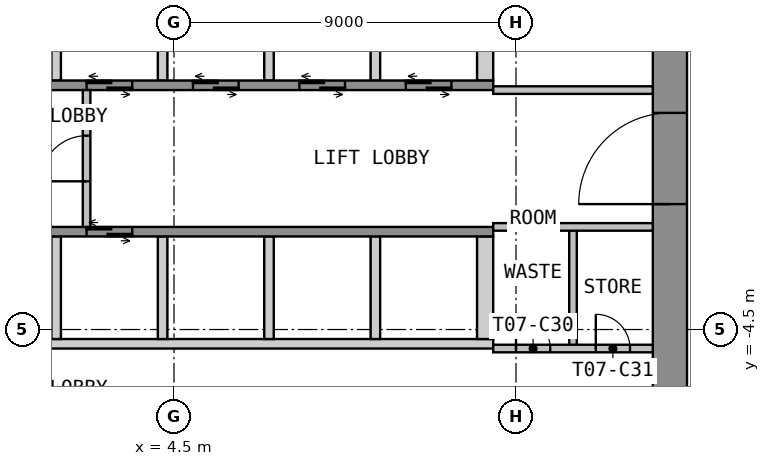
"""IFC4 building model, lengths in metres.
Left out: names, types, materials, properties, quantities, classifications, styles, units other than length and angle.
Written with IfcOpenShell. Run it as: python <this file> out.ifc"""

import sys

from ifc_helpers import new_model, si_unit, direction, frame, frame_2d, origin, place, context, subcontext, project, spatial, polyline, rectangle, outline, extrude, element, fill, save


model = new_model("IFC4")
c1 = context("Model", 3, precision=1e-05, world=origin(), true_north=direction((0.0, 1.0)))
c2 = subcontext(c1, "Body", "Model", "MODEL_VIEW")
j1 = project(units=[si_unit("LENGTHUNIT", "METRE"), si_unit("PLANEANGLEUNIT", "RADIAN")], contexts=[c1])
p1 = place(None, origin())
s1 = spatial("IfcSite", under=j1, at=p1, CompositionType="ELEMENT")
p2 = place(p1, origin())
s2 = spatial("IfcBuilding", under=s1, at=p2, CompositionType="ELEMENT")
p3 = place(p2, frame((0.0, 0.0, 104.7)))
s3 = spatial("IfcBuildingStorey", under=s2, at=p3, CompositionType="ELEMENT", Elevation=104.7)
p4 = place(p3, frame((17.55, -12.6, 0.0), z_axis=(0.0, 0.0, 1.0), x_axis=(0.0, 1.0, 0.0)))
e1 = element("IfcWall", 1, at=p4, inside=s3, PredefinedType="SHEAR", context=c2, shape_type="SweptSolid", body=[
    extrude(rectangle(XDim=25.2, YDim=0.9, at=frame_2d((12.6, 0.0))), origin(), (0.0, 0.0, 1.0), 3.525),
])
p5 = place(p4, frame((11.4, 0.0, 0.0)))
e2 = element("IfcOpeningElement", 2, at=p5, cuts=e1, PredefinedType="OPENING", context=c2, shape_type="SweptSolid", body=[
    extrude(rectangle(XDim=2.4, YDim=2.1, at=frame_2d((1.2, 1.05))), frame((0.0, 0.46, 0.0), z_axis=(0.0, -1.0, 0.0), x_axis=(1.0, 0.0, 0.0)), (0.0, 0.0, 1.0), 0.92),
])
p6 = place(p3, origin())
e3 = element("IfcWall", 3, at=p6, inside=s3, PredefinedType="SHEAR", context=c2, shape_type="SweptSolid", body=[
    extrude(outline(polyline([(1.275, 2.05), (1.525, 2.05), (1.525, 4.75), (1.275, 4.75), (1.275, 2.05)])), origin(), (0.0, 0.0, 1.0), 3.525),
])
p7 = place(p3, origin())
e4 = element("IfcWall", 4, at=p7, inside=s3, PredefinedType="SHEAR", context=c2, shape_type="SweptSolid", body=[
    extrude(outline(polyline([(4.075, 2.05), (4.325, 2.05), (4.325, 4.75), (4.075, 4.75), (4.075, 2.05)])), origin(), (0.0, 0.0, 1.0), 3.525),
])
p8 = place(p3, origin())
e5 = element("IfcWall", 5, at=p8, inside=s3, PredefinedType="SHEAR", context=c2, shape_type="SweptSolid", body=[
    extrude(outline(polyline([(6.875, 2.05), (7.125, 2.05), (7.125, 4.75), (6.875, 4.75), (6.875, 2.05)])), origin(), (0.0, 0.0, 1.0), 3.525),
])
p9 = place(p3, origin())
e6 = element("IfcWall", 6, at=p9, inside=s3, PredefinedType="SHEAR", context=c2, shape_type="SweptSolid", body=[
    extrude(outline(polyline([(9.675, 2.05), (9.925, 2.05), (9.925, 4.75), (9.675, 4.75), (9.675, 2.05)])), origin(), (0.0, 0.0, 1.0), 3.525),
])
p10 = place(p3, origin())
e7 = element("IfcWall", 7, at=p10, inside=s3, PredefinedType="SHEAR", context=c2, shape_type="SweptSolid", body=[
    extrude(outline(polyline([(12.475, 2.05), (12.9, 2.05), (12.9, 4.75), (12.475, 4.75), (12.475, 2.05)])), origin(), (0.0, 0.0, 1.0), 3.525),
])
p11 = place(p3, frame((-12.9, 1.925, 0.0), z_axis=(0.0, 0.0, 1.0), x_axis=(1.0, 0.0, 0.0)))
e8 = element("IfcWall", 8, at=p11, inside=s3, PredefinedType="SHEAR", context=c2, shape_type="SweptSolid", body=[
    extrude(rectangle(XDim=25.8, YDim=0.25, at=frame_2d((12.9, 0.0))), origin(), (0.0, 0.0, 1.0), 3.525),
])
p12 = place(p11, frame((9.5, 0.0, 0.0)))
e9 = element("IfcOpeningElement", 9, at=p12, cuts=e8, PredefinedType="OPENING", context=c2, shape_type="SweptSolid", body=[
    extrude(rectangle(XDim=1.2, YDim=2.1, at=frame_2d((0.6, 1.05))), frame((0.0, 0.135, 0.0), z_axis=(0.0, -1.0, 0.0), x_axis=(1.0, 0.0, 0.0)), (0.0, 0.0, 1.0), 0.27),
])
p13 = place(p11, frame((12.3, 0.0, 0.0)))
e10 = element("IfcOpeningElement", 10, at=p13, cuts=e8, PredefinedType="OPENING", context=c2, shape_type="SweptSolid", body=[
    extrude(rectangle(XDim=1.2, YDim=2.1, at=frame_2d((0.6, 1.05))), frame((0.0, 0.135, 0.0), z_axis=(0.0, -1.0, 0.0), x_axis=(1.0, 0.0, 0.0)), (0.0, 0.0, 1.0), 0.27),
])
p14 = place(p11, frame((15.1, 0.0, 0.0)))
e11 = element("IfcOpeningElement", 11, at=p14, cuts=e8, PredefinedType="OPENING", context=c2, shape_type="SweptSolid", body=[
    extrude(rectangle(XDim=1.2, YDim=2.1, at=frame_2d((0.6, 1.05))), frame((0.0, 0.135, 0.0), z_axis=(0.0, -1.0, 0.0), x_axis=(1.0, 0.0, 0.0)), (0.0, 0.0, 1.0), 0.27),
])
p15 = place(p11, frame((17.9, 0.0, 0.0)))
e12 = element("IfcOpeningElement", 12, at=p15, cuts=e8, PredefinedType="OPENING", context=c2, shape_type="SweptSolid", body=[
    extrude(rectangle(XDim=1.2, YDim=2.1, at=frame_2d((0.6, 1.05))), frame((0.0, 0.135, 0.0), z_axis=(0.0, -1.0, 0.0), x_axis=(1.0, 0.0, 0.0)), (0.0, 0.0, 1.0), 0.27),
])
p16 = place(p11, frame((20.7, 0.0, 0.0)))
e13 = element("IfcOpeningElement", 13, at=p16, cuts=e8, PredefinedType="OPENING", context=c2, shape_type="SweptSolid", body=[
    extrude(rectangle(XDim=1.2, YDim=2.1, at=frame_2d((0.6, 1.05))), frame((0.0, 0.135, 0.0), z_axis=(0.0, -1.0, 0.0), x_axis=(1.0, 0.0, 0.0)), (0.0, 0.0, 1.0), 0.27),
])
p17 = place(p11, frame((23.5, 0.0, 0.0)))
e14 = element("IfcOpeningElement", 14, at=p17, cuts=e8, PredefinedType="OPENING", context=c2, shape_type="SweptSolid", body=[
    extrude(rectangle(XDim=1.2, YDim=2.1, at=frame_2d((0.6, 1.05))), frame((0.0, 0.135, 0.0), z_axis=(0.0, -1.0, 0.0), x_axis=(1.0, 0.0, 0.0)), (0.0, 0.0, 1.0), 0.27),
])
p18 = place(p3, origin())
e15 = element("IfcWall", 15, at=p18, inside=s3, PredefinedType="SHEAR", context=c2, shape_type="SweptSolid", body=[
    extrude(outline(polyline([(-12.9, -5.0), (12.9, -5.0), (12.9, -4.75), (-12.9, -4.75), (-12.9, -5.0)])), origin(), (0.0, 0.0, 1.0), 3.525),
])
p19 = place(p3, origin())
e16 = element("IfcWall", 16, at=p19, inside=s3, PredefinedType="SHEAR", context=c2, shape_type="SweptSolid", body=[
    extrude(outline(polyline([(1.275, -4.75), (1.525, -4.75), (1.525, -2.05), (1.275, -2.05), (1.275, -4.75)])), origin(), (0.0, 0.0, 1.0), 3.525),
])
p20 = place(p3, origin())
e17 = element("IfcWall", 17, at=p20, inside=s3, PredefinedType="SHEAR", context=c2, shape_type="SweptSolid", body=[
    extrude(outline(polyline([(4.075, -4.75), (4.325, -4.75), (4.325, -2.05), (4.075, -2.05), (4.075, -4.75)])), origin(), (0.0, 0.0, 1.0), 3.525),
])
p21 = place(p3, origin())
e18 = element("IfcWall", 18, at=p21, inside=s3, PredefinedType="SHEAR", context=c2, shape_type="SweptSolid", body=[
    extrude(outline(polyline([(6.875, -4.75), (7.125, -4.75), (7.125, -2.05), (6.875, -2.05), (6.875, -4.75)])), origin(), (0.0, 0.0, 1.0), 3.525),
])
p22 = place(p3, origin())
e19 = element("IfcWall", 19, at=p22, inside=s3, PredefinedType="SHEAR", context=c2, shape_type="SweptSolid", body=[
    extrude(outline(polyline([(9.675, -4.75), (9.925, -4.75), (9.925, -2.05), (9.675, -2.05), (9.675, -4.75)])), origin(), (0.0, 0.0, 1.0), 3.525),
])
p23 = place(p3, origin())
e20 = element("IfcWall", 20, at=p23, inside=s3, PredefinedType="SHEAR", context=c2, shape_type="SweptSolid", body=[
    extrude(outline(polyline([(12.475, -4.75), (12.9, -4.75), (12.9, -2.05), (12.475, -2.05), (12.475, -4.75)])), origin(), (0.0, 0.0, 1.0), 3.525),
])
p24 = place(p3, frame((-12.9, -1.925, 0.0), z_axis=(0.0, 0.0, 1.0), x_axis=(1.0, 0.0, 0.0)))
e21 = element("IfcWall", 21, at=p24, inside=s3, PredefinedType="SHEAR", context=c2, shape_type="SweptSolid", body=[
    extrude(rectangle(XDim=25.8, YDim=0.25, at=frame_2d((12.9, 0.0))), origin(), (0.0, 0.0, 1.0), 3.525),
])
p25 = place(p24, frame((1.1, 0.0, 0.0)))
e22 = element("IfcOpeningElement", 22, at=p25, cuts=e21, PredefinedType="OPENING", context=c2, shape_type="SweptSolid", body=[
    extrude(rectangle(XDim=1.2, YDim=2.1, at=frame_2d((0.6, 1.05))), frame((0.0, 0.135, 0.0), z_axis=(0.0, -1.0, 0.0), x_axis=(1.0, 0.0, 0.0)), (0.0, 0.0, 1.0), 0.27),
])
p26 = place(p24, frame((3.9, 0.0, 0.0)))
e23 = element("IfcOpeningElement", 23, at=p26, cuts=e21, PredefinedType="OPENING", context=c2, shape_type="SweptSolid", body=[
    extrude(rectangle(XDim=1.2, YDim=2.1, at=frame_2d((0.6, 1.05))), frame((0.0, 0.135, 0.0), z_axis=(0.0, -1.0, 0.0), x_axis=(1.0, 0.0, 0.0)), (0.0, 0.0, 1.0), 0.27),
])
p27 = place(p24, frame((6.7, 0.0, 0.0)))
e24 = element("IfcOpeningElement", 24, at=p27, cuts=e21, PredefinedType="OPENING", context=c2, shape_type="SweptSolid", body=[
    extrude(rectangle(XDim=1.2, YDim=2.1, at=frame_2d((0.6, 1.05))), frame((0.0, 0.135, 0.0), z_axis=(0.0, -1.0, 0.0), x_axis=(1.0, 0.0, 0.0)), (0.0, 0.0, 1.0), 0.27),
])
p28 = place(p24, frame((9.5, 0.0, 0.0)))
e25 = element("IfcOpeningElement", 25, at=p28, cuts=e21, PredefinedType="OPENING", context=c2, shape_type="SweptSolid", body=[
    extrude(rectangle(XDim=1.2, YDim=2.1, at=frame_2d((0.6, 1.05))), frame((0.0, 0.135, 0.0), z_axis=(0.0, -1.0, 0.0), x_axis=(1.0, 0.0, 0.0)), (0.0, 0.0, 1.0), 0.27),
])
p29 = place(p24, frame((12.3, 0.0, 0.0)))
e26 = element("IfcOpeningElement", 26, at=p29, cuts=e21, PredefinedType="OPENING", context=c2, shape_type="SweptSolid", body=[
    extrude(rectangle(XDim=1.2, YDim=2.1, at=frame_2d((0.6, 1.05))), frame((0.0, 0.135, 0.0), z_axis=(0.0, -1.0, 0.0), x_axis=(1.0, 0.0, 0.0)), (0.0, 0.0, 1.0), 0.27),
])
p30 = place(p24, frame((15.1, 0.0, 0.0)))
e27 = element("IfcOpeningElement", 27, at=p30, cuts=e21, PredefinedType="OPENING", context=c2, shape_type="SweptSolid", body=[
    extrude(rectangle(XDim=1.2, YDim=2.1, at=frame_2d((0.6, 1.05))), frame((0.0, 0.135, 0.0), z_axis=(0.0, -1.0, 0.0), x_axis=(1.0, 0.0, 0.0)), (0.0, 0.0, 1.0), 0.27),
])
p31 = place(p3, frame((2.2, -1.8, 0.0), z_axis=(0.0, 0.0, 1.0), x_axis=(0.0, 1.0, 0.0)))
e28 = element("IfcWall", 28, at=p31, inside=s3, PredefinedType="PARTITIONING", context=c2, shape_type="SweptSolid", body=[
    extrude(rectangle(XDim=3.6, YDim=0.2, at=frame_2d((1.8, 0.0))), origin(), (0.0, 0.0, 1.0), 3.525),
])
p32 = place(p31, frame((1.2, 0.0, 0.0)))
e29 = element("IfcOpeningElement", 29, at=p32, cuts=e28, PredefinedType="OPENING", context=c2, shape_type="SweptSolid", body=[
    extrude(rectangle(XDim=1.2, YDim=2.1, at=frame_2d((0.6, 1.05))), frame((0.0, 0.11, 0.0), z_axis=(0.0, -1.0, 0.0), x_axis=(1.0, 0.0, 0.0)), (0.0, 0.0, 1.0), 0.22),
])
p33 = place(p3, frame((12.9, 1.8, 0.0), z_axis=(0.0, 0.0, 1.0), x_axis=(1.0, 0.0, 0.0)))
e30 = element("IfcWall", 30, at=p33, inside=s3, PredefinedType="PARTITIONING", context=c2, shape_type="SweptSolid", body=[
    extrude(rectangle(XDim=4.2, YDim=0.2, at=frame_2d((2.1, 0.0))), origin(), (0.0, 0.0, 1.0), 3.525),
])
p34 = place(p3, frame((15.0, -5.0, 0.0), z_axis=(0.0, 0.0, 1.0), x_axis=(0.0, 1.0, 0.0)))
e31 = element("IfcWall", 31, at=p34, inside=s3, PredefinedType="PARTITIONING", context=c2, shape_type="SweptSolid", body=[
    extrude(rectangle(XDim=3.2, YDim=0.2, at=frame_2d((1.6, 0.0))), origin(), (0.0, 0.0, 1.0), 3.525),
])
p35 = place(p3, frame((12.9, -5.0, 0.0), z_axis=(0.0, 0.0, 1.0), x_axis=(1.0, 0.0, 0.0)))
e32 = element("IfcWall", 32, at=p35, inside=s3, PredefinedType="PARTITIONING", context=c2, shape_type="SweptSolid", body=[
    extrude(rectangle(XDim=4.2, YDim=0.2, at=frame_2d((2.1, 0.0))), origin(), (0.0, 0.0, 1.0), 3.525),
])
p36 = place(p35, frame((0.6, 0.0, 0.0)))
e33 = element("IfcOpeningElement", 33, at=p36, cuts=e32, PredefinedType="OPENING", context=c2, shape_type="SweptSolid", body=[
    extrude(rectangle(XDim=0.9, YDim=2.1, at=frame_2d((0.45, 1.05))), frame((0.0, 0.11, 0.0), z_axis=(0.0, -1.0, 0.0), x_axis=(1.0, 0.0, 0.0)), (0.0, 0.0, 1.0), 0.22),
])
p37 = place(p35, frame((2.7, 0.0, 0.0)))
e34 = element("IfcOpeningElement", 34, at=p37, cuts=e32, PredefinedType="OPENING", context=c2, shape_type="SweptSolid", body=[
    extrude(rectangle(XDim=0.9, YDim=2.1, at=frame_2d((0.45, 1.05))), frame((0.0, 0.11, 0.0), z_axis=(0.0, -1.0, 0.0), x_axis=(1.0, 0.0, 0.0)), (0.0, 0.0, 1.0), 0.22),
])
p38 = place(p3, frame((12.9, -1.8, 0.0), z_axis=(0.0, 0.0, 1.0), x_axis=(1.0, 0.0, 0.0)))
e35 = element("IfcWall", 35, at=p38, inside=s3, PredefinedType="PARTITIONING", context=c2, shape_type="SweptSolid", body=[
    extrude(rectangle(XDim=4.2, YDim=0.2, at=frame_2d((2.1, 0.0))), origin(), (0.0, 0.0, 1.0), 3.525),
])
p39 = place(p5, origin())
e36 = element("IfcDoor", 36, at=p39, inside=s3, OperationType="DOUBLE_DOOR_DOUBLE_SWING", PredefinedType="DOOR", context=c2, shape_type="SweptSolid", body=[
    extrude(rectangle(XDim=2.4, YDim=2.1, at=frame_2d((1.2, 1.05))), frame((0.0, 0.025, 0.0), z_axis=(0.0, -1.0, 0.0), x_axis=(1.0, 0.0, 0.0)), (0.0, 0.0, 1.0), 0.05),
])
fill(e2, e36)
p40 = place(p14, origin())
e37 = element("IfcDoor", 37, at=p40, inside=s3, OperationType="DOUBLE_DOOR_SLIDING", PredefinedType="DOOR", context=c2, shape_type="SweptSolid", body=[
    extrude(rectangle(XDim=1.2, YDim=2.1, at=frame_2d((0.6, 1.05))), frame((0.0, 0.025, 0.0), z_axis=(0.0, -1.0, 0.0), x_axis=(1.0, 0.0, 0.0)), (0.0, 0.0, 1.0), 0.05),
])
fill(e11, e37)
p41 = place(p15, origin())
e38 = element("IfcDoor", 38, at=p41, inside=s3, OperationType="DOUBLE_DOOR_SLIDING", PredefinedType="DOOR", context=c2, shape_type="SweptSolid", body=[
    extrude(rectangle(XDim=1.2, YDim=2.1, at=frame_2d((0.6, 1.05))), frame((0.0, 0.025, 0.0), z_axis=(0.0, -1.0, 0.0), x_axis=(1.0, 0.0, 0.0)), (0.0, 0.0, 1.0), 0.05),
])
fill(e12, e38)
p42 = place(p16, origin())
e39 = element("IfcDoor", 39, at=p42, inside=s3, OperationType="DOUBLE_DOOR_SLIDING", PredefinedType="DOOR", context=c2, shape_type="SweptSolid", body=[
    extrude(rectangle(XDim=1.2, YDim=2.1, at=frame_2d((0.6, 1.05))), frame((0.0, 0.025, 0.0), z_axis=(0.0, -1.0, 0.0), x_axis=(1.0, 0.0, 0.0)), (0.0, 0.0, 1.0), 0.05),
])
fill(e13, e39)
p43 = place(p17, origin())
e40 = element("IfcDoor", 40, at=p43, inside=s3, OperationType="DOUBLE_DOOR_SLIDING", PredefinedType="DOOR", context=c2, shape_type="SweptSolid", body=[
    extrude(rectangle(XDim=1.2, YDim=2.1, at=frame_2d((0.6, 1.05))), frame((0.0, 0.025, 0.0), z_axis=(0.0, -1.0, 0.0), x_axis=(1.0, 0.0, 0.0)), (0.0, 0.0, 1.0), 0.05),
])
fill(e14, e40)
p44 = place(p30, origin())
e41 = element("IfcDoor", 41, at=p44, inside=s3, OperationType="DOUBLE_DOOR_SLIDING", PredefinedType="DOOR", context=c2, shape_type="SweptSolid", body=[
    extrude(rectangle(XDim=1.2, YDim=2.1, at=frame_2d((0.6, 1.05))), frame((0.0, 0.025, 0.0), z_axis=(0.0, -1.0, 0.0), x_axis=(1.0, 0.0, 0.0)), (0.0, 0.0, 1.0), 0.05),
])
fill(e27, e41)
p45 = place(p32, origin())
e42 = element("IfcDoor", 42, at=p45, inside=s3, OperationType="SINGLE_SWING_LEFT", PredefinedType="DOOR", context=c2, shape_type="SweptSolid", body=[
    extrude(rectangle(XDim=1.2, YDim=2.1, at=frame_2d((0.6, 1.05))), frame((0.0, 0.025, 0.0), z_axis=(0.0, -1.0, 0.0), x_axis=(1.0, 0.0, 0.0)), (0.0, 0.0, 1.0), 0.05),
])
fill(e29, e42)
p46 = place(p36, origin())
e43 = element("IfcDoor", 43, at=p46, inside=s3, OperationType="SINGLE_SWING_LEFT", PredefinedType="DOOR", context=c2, shape_type="SweptSolid", body=[
    extrude(rectangle(XDim=0.9, YDim=2.1, at=frame_2d((0.45, 1.05))), frame((0.0, 0.025, 0.0), z_axis=(0.0, -1.0, 0.0), x_axis=(1.0, 0.0, 0.0)), (0.0, 0.0, 1.0), 0.05),
])
fill(e33, e43)
p47 = place(p37, origin())
e44 = element("IfcDoor", 44, at=p47, inside=s3, OperationType="SINGLE_SWING_LEFT", PredefinedType="DOOR", context=c2, shape_type="SweptSolid", body=[
    extrude(rectangle(XDim=0.9, YDim=2.1, at=frame_2d((0.45, 1.05))), frame((0.0, 0.025, 0.0), z_axis=(0.0, -1.0, 0.0), x_axis=(1.0, 0.0, 0.0)), (0.0, 0.0, 1.0), 0.05),
])
fill(e34, e44)
save(model, sys.argv[1])
